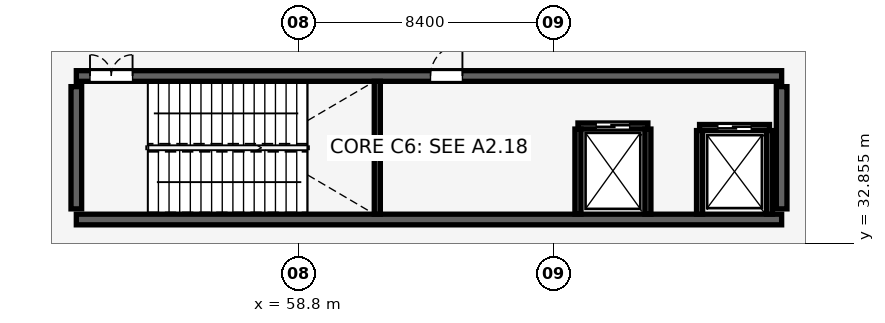
"""IFC4 building model, lengths in metres.
Left out: names, types, materials, properties, quantities, classifications, styles, units other than length and angle.
Written with IfcOpenShell. Run it as: python <this file> out.ifc"""

import sys

from ifc_helpers import new_model, si_unit, direction, frame, frame_2d, origin, place, context, subcontext, project, spatial, rectangle, extrude, element, fill, save


model = new_model("IFC4")
c1 = context("Model", 3, precision=1e-05, world=origin(), true_north=direction((0.0, 1.0)))
c2 = subcontext(c1, "Body", "Model", "MODEL_VIEW")
j1 = project(units=[si_unit("LENGTHUNIT", "METRE"), si_unit("PLANEANGLEUNIT", "RADIAN")], contexts=[c1])
p1 = place(None, origin())
s1 = spatial("IfcSite", under=j1, at=p1, CompositionType="ELEMENT")
p2 = place(p1, origin())
s2 = spatial("IfcBuilding", under=s1, at=p2, CompositionType="ELEMENT")
p3 = place(p2, origin())
s3 = spatial("IfcBuildingStorey", under=s2, at=p3, CompositionType="ELEMENT", Elevation=0.0)
p4 = place(p3, frame((51.5, 33.64, 0.0), z_axis=(0.0, 0.0, 1.0), x_axis=(1.0, 0.0, 0.0)))
e1 = element("IfcWall", 1, at=p4, inside=s3, PredefinedType="SHEAR", context=c2, shape_type="SweptSolid", body=[
    extrude(rectangle(XDim=23.2, YDim=0.35, at=frame_2d((11.6, 0.0))), origin(), (0.0, 0.0, 1.0), 5.15),
])
p5 = place(p3, frame((51.5, 38.36, 0.0), z_axis=(0.0, 0.0, 1.0), x_axis=(1.0, 0.0, 0.0)))
e2 = element("IfcWall", 2, at=p5, inside=s3, PredefinedType="SHEAR", context=c2, shape_type="SweptSolid", body=[
    extrude(rectangle(XDim=23.2, YDim=0.35, at=frame_2d((11.6, 0.0))), origin(), (0.0, 0.0, 1.0), 5.15),
])
p6 = place(p5, frame((0.45, 0.0, 0.0), z_axis=(0.0, 0.0, 1.0), x_axis=(1.0, 0.0, 0.0)))
e3 = element("IfcOpeningElement", 3, at=p6, cuts=e2, PredefinedType="OPENING", context=c2, shape_type="SweptSolid", body=[
    extrude(rectangle(XDim=1.4, YDim=2.15, at=frame_2d((0.7, 1.075))), frame((0.0, 0.185, 0.0), z_axis=(0.0, -1.0, 0.0), x_axis=(1.0, 0.0, 0.0)), (0.0, 0.0, 1.0), 0.37),
])
p7 = place(p5, frame((11.65, 0.0, 0.0), z_axis=(0.0, 0.0, 1.0), x_axis=(1.0, 0.0, 0.0)))
e4 = element("IfcOpeningElement", 4, at=p7, cuts=e2, PredefinedType="OPENING", context=c2, shape_type="SweptSolid", body=[
    extrude(rectangle(XDim=1.05, YDim=2.15, at=frame_2d((0.525, 1.075))), frame((0.0, 0.185, 0.0), z_axis=(0.0, -1.0, 0.0), x_axis=(1.0, 0.0, 0.0)), (0.0, 0.0, 1.0), 0.37),
])
for number, where, z_axis, x_axis in (
    (5, (51.5, 33.99, 0.0), (0.0, 0.0, 1.0), (0.0, 1.0, 0.0)),
    (6, (74.7, 33.99, 0.0), (0.0, 0.0, 1.0), (0.0, 1.0, 0.0)),
):
    element("IfcWall", number, at=place(p3, frame(where, z_axis=z_axis, x_axis=x_axis)), inside=s3, PredefinedType="SHEAR", context=c2, shape_type="SweptSolid", body=[
        extrude(rectangle(XDim=4.02, YDim=0.35, at=frame_2d((2.01, 0.0))), origin(), (0.0, 0.0, 1.0), 5.15),
    ])
p8 = place(p3, frame((61.4, 33.815, 0.0), z_axis=(0.0, 0.0, 1.0), x_axis=(0.0, 1.0, 0.0)))
e7 = element("IfcWall", 7, at=p8, inside=s3, PredefinedType="SHEAR", context=c2, shape_type="SweptSolid", body=[
    extrude(rectangle(XDim=4.37, YDim=0.2, at=frame_2d((2.185, 0.0))), origin(), (0.0, 0.0, 1.0), 5.15),
])
p9 = place(p3, frame((68.0, 36.715, 0.0), z_axis=(0.0, 0.0, 1.0), x_axis=(1.0, 0.0, 0.0)))
e8 = element("IfcWall", 8, at=p9, inside=s3, PredefinedType="SHEAR", context=c2, shape_type="SweptSolid", body=[
    extrude(rectangle(XDim=2.3, YDim=0.2, at=frame_2d((1.15, 0.0))), origin(), (0.0, 0.0, 1.0), 5.15),
])
p10 = place(p9, frame((0.6, 0.0, 0.0), z_axis=(0.0, 0.0, 1.0), x_axis=(1.0, 0.0, 0.0)))
e9 = element("IfcOpeningElement", 9, at=p10, cuts=e8, PredefinedType="OPENING", context=c2, shape_type="SweptSolid", body=[
    extrude(rectangle(XDim=1.1, YDim=2.15, at=frame_2d((0.55, 1.075))), frame((0.0, 0.11, 0.0), z_axis=(0.0, -1.0, 0.0), x_axis=(1.0, 0.0, 0.0)), (0.0, 0.0, 1.0), 0.22),
])
for number, where, z_axis, x_axis in (
    (10, (68.0, 33.815, 0.0), (0.0, 0.0, 1.0), (0.0, 1.0, 0.0)),
    (11, (70.3, 33.815, 0.0), (0.0, 0.0, 1.0), (0.0, 1.0, 0.0)),
):
    element("IfcWall", number, at=place(p3, frame(where, z_axis=z_axis, x_axis=x_axis)), inside=s3, PredefinedType="SHEAR", context=c2, shape_type="SweptSolid", body=[
        extrude(rectangle(XDim=2.8, YDim=0.2, at=frame_2d((1.4, 0.0))), origin(), (0.0, 0.0, 1.0), 5.15),
    ])
p11 = place(p3, frame((72.0, 36.665, 0.0), z_axis=(0.0, 0.0, 1.0), x_axis=(1.0, 0.0, 0.0)))
e12 = element("IfcWall", 12, at=p11, inside=s3, PredefinedType="SHEAR", context=c2, shape_type="SweptSolid", body=[
    extrude(rectangle(XDim=2.3, YDim=0.2, at=frame_2d((1.15, 0.0))), origin(), (0.0, 0.0, 1.0), 5.15),
])
p12 = place(p11, frame((0.6, 0.0, 0.0), z_axis=(0.0, 0.0, 1.0), x_axis=(1.0, 0.0, 0.0)))
e13 = element("IfcOpeningElement", 13, at=p12, cuts=e12, PredefinedType="OPENING", context=c2, shape_type="SweptSolid", body=[
    extrude(rectangle(XDim=1.1, YDim=2.15, at=frame_2d((0.55, 1.075))), frame((0.0, 0.11, 0.0), z_axis=(0.0, -1.0, 0.0), x_axis=(1.0, 0.0, 0.0)), (0.0, 0.0, 1.0), 0.22),
])
for number, where, z_axis, x_axis in (
    (14, (72.0, 33.815, 0.0), (0.0, 0.0, 1.0), (0.0, 1.0, 0.0)),
    (15, (74.3, 33.815, 0.0), (0.0, 0.0, 1.0), (0.0, 1.0, 0.0)),
):
    element("IfcWall", number, at=place(p3, frame(where, z_axis=z_axis, x_axis=x_axis)), inside=s3, PredefinedType="SHEAR", context=c2, shape_type="SweptSolid", body=[
        extrude(rectangle(XDim=2.75, YDim=0.2, at=frame_2d((1.375, 0.0))), origin(), (0.0, 0.0, 1.0), 5.15),
    ])
p13 = place(p6, origin())
e16 = element("IfcDoor", 16, at=p13, inside=s3, OperationType="DOUBLE_DOOR_SINGLE_SWING", PredefinedType="DOOR", context=c2, shape_type="SweptSolid", body=[
    extrude(rectangle(XDim=1.4, YDim=2.15, at=frame_2d((0.7, 1.075))), frame((0.0, 0.025, 0.0), z_axis=(0.0, -1.0, 0.0), x_axis=(1.0, 0.0, 0.0)), (0.0, 0.0, 1.0), 0.05),
])
fill(e3, e16)
p14 = place(p7, origin())
e17 = element("IfcDoor", 17, at=p14, inside=s3, OperationType="SINGLE_SWING_RIGHT", PredefinedType="DOOR", context=c2, shape_type="SweptSolid", body=[
    extrude(rectangle(XDim=1.05, YDim=2.15, at=frame_2d((0.525, 1.075))), frame((0.0, 0.025, 0.0), z_axis=(0.0, -1.0, 0.0), x_axis=(1.0, 0.0, 0.0)), (0.0, 0.0, 1.0), 0.05),
])
fill(e4, e17)
p15 = place(p10, origin())
e18 = element("IfcDoor", 18, at=p15, inside=s3, OperationType="DOUBLE_DOOR_SLIDING", PredefinedType="DOOR", context=c2, shape_type="SweptSolid", body=[
    extrude(rectangle(XDim=1.1, YDim=2.15, at=frame_2d((0.55, 1.075))), frame((0.0, 0.025, 0.0), z_axis=(0.0, -1.0, 0.0), x_axis=(1.0, 0.0, 0.0)), (0.0, 0.0, 1.0), 0.05),
])
fill(e9, e18)
p16 = place(p12, origin())
e19 = element("IfcDoor", 19, at=p16, inside=s3, OperationType="DOUBLE_DOOR_SLIDING", PredefinedType="DOOR", context=c2, shape_type="SweptSolid", body=[
    extrude(rectangle(XDim=1.1, YDim=2.15, at=frame_2d((0.55, 1.075))), frame((0.0, 0.025, 0.0), z_axis=(0.0, -1.0, 0.0), x_axis=(1.0, 0.0, 0.0)), (0.0, 0.0, 1.0), 0.05),
])
fill(e13, e19)
save(model, sys.argv[1])
